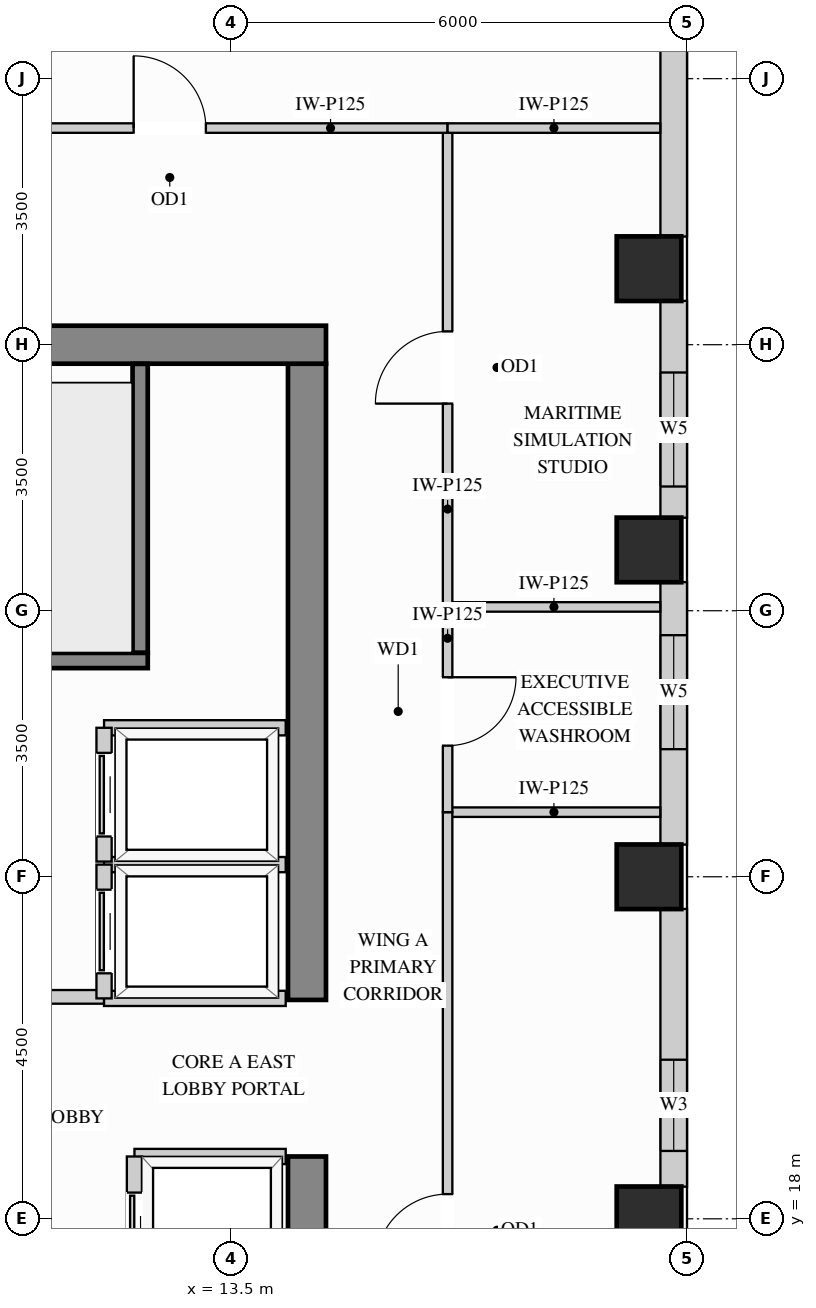
"""IFC4 building model, lengths in metres.
Left out: names, types, materials, properties, quantities, classifications, styles, units other than length and angle.
Written with IfcOpenShell. Run it as: python <this file> out.ifc"""

import sys

from ifc_helpers import new_model, si_unit, direction, frame, frame_2d, origin, origin_2d, place, context, subcontext, project, spatial, rectangle, extrude, source, transform, mapped, element, fill, save


model = new_model("IFC4")
c1 = context("Model", 3, precision=1e-05, world=origin(), true_north=direction((0.0, 1.0)))
c2 = subcontext(c1, "Body", "Model", "MODEL_VIEW")
j1 = project(units=[si_unit("LENGTHUNIT", "METRE"), si_unit("PLANEANGLEUNIT", "RADIAN")], contexts=[c1])
p1 = place(None, origin())
s1 = spatial("IfcSite", under=j1, at=p1, CompositionType="ELEMENT")
p2 = place(p1, origin())
s2 = spatial("IfcBuilding", under=s1, at=p2, CompositionType="ELEMENT")
p3 = place(p2, frame((0.0, 0.0, 266.4)))
s3 = spatial("IfcBuildingStorey", under=s2, at=p3, CompositionType="ELEMENT", Elevation=266.4)
m1 = source(origin(), c2, "Body", "SweptSolid", [
    extrude(rectangle(XDim=0.85, YDim=0.85, at=origin_2d()), origin(), (0.0, 0.0, 1.0), 3.4),
])
for number, where, z_axis, x_axis in (
    (1, (19.0, 18.0, 0.0), (0.0, 0.0, 1.0), (1.0, 0.0, 0.0)),
    (2, (19.0, 22.5, 0.0), (0.0, 0.0, 1.0), (1.0, 0.0, 0.0)),
    (3, (19.0, 26.8, 0.0), (0.0, 0.0, 1.0), (1.0, 0.0, 0.0)),
    (4, (19.0, 30.5, 0.0), (0.0, 0.0, 1.0), (1.0, 0.0, 0.0)),
):
    element("IfcColumn", number, at=place(p3, frame(where, z_axis=z_axis, x_axis=x_axis)), inside=s3, PredefinedType="COLUMN", context=c2, shape_type="MappedRepresentation", body=[
        mapped(m1, transform((0.0, 0.0, 0.0), x_axis=(1.0, 0.0, 0.0), y_axis=(0.0, 1.0, 0.0), z_axis=(0.0, 0.0, 1.0))),
    ])
m2 = source(origin(), c2, "Body", "SweptSolid", [
    extrude(rectangle(XDim=10.07, YDim=0.5, at=frame_2d((5.035, 0.0))), origin(), (0.0, 0.0, 1.0), 3.4),
])
p4 = place(p3, frame((14.5, 8.75, 0.0), z_axis=(0.0, 0.0, 1.0), x_axis=(0.0, 1.0, 0.0)))
e5 = element("IfcWall", 5, at=p4, inside=s3, PredefinedType="SHEAR", context=c2, shape_type="MappedRepresentation", body=[
    mapped(m2, transform((0.0, 0.0, 0.0), x_axis=(1.0, 0.0, 0.0), y_axis=(0.0, 1.0, 0.0), z_axis=(0.0, 0.0, 1.0))),
])
m3 = source(origin(), c2, "Body", "SweptSolid", [
    extrude(rectangle(XDim=8.37, YDim=0.5, at=frame_2d((4.185, 0.0))), origin(), (0.0, 0.0, 1.0), 3.4),
])
p5 = place(p3, frame((14.5, 20.88, 0.0), z_axis=(0.0, 0.0, 1.0), x_axis=(0.0, 1.0, 0.0)))
e6 = element("IfcWall", 6, at=p5, inside=s3, PredefinedType="SHEAR", context=c2, shape_type="MappedRepresentation", body=[
    mapped(m3, transform((0.0, 0.0, 0.0), x_axis=(1.0, 0.0, 0.0), y_axis=(0.0, 1.0, 0.0), z_axis=(0.0, 0.0, 1.0))),
])
m4 = source(origin(), c2, "Body", "SweptSolid", [
    extrude(rectangle(XDim=10.5, YDim=0.5, at=frame_2d((5.25, 0.0))), origin(), (0.0, 0.0, 1.0), 3.4),
])
p6 = place(p3, frame((4.25, 29.5, 0.0), z_axis=(0.0, 0.0, 1.0), x_axis=(1.0, 0.0, 0.0)))
e7 = element("IfcWall", 7, at=p6, inside=s3, PredefinedType="SHEAR", context=c2, shape_type="MappedRepresentation", body=[
    mapped(m4, transform((0.0, 0.0, 0.0), x_axis=(1.0, 0.0, 0.0), y_axis=(0.0, 1.0, 0.0), z_axis=(0.0, 0.0, 1.0))),
])
p7 = place(p3, frame((19.325, 18.423, 0.0), z_axis=(0.0, 0.0, 1.0), x_axis=(0.0, 1.0, 0.0)))
e8 = element("IfcWall", 8, at=p7, inside=s3, PredefinedType="SOLIDWALL", context=c2, shape_type="SweptSolid", body=[
    extrude(rectangle(XDim=3.654, YDim=0.35, at=frame_2d((1.827, 0.0))), origin(), (0.0, 0.0, 1.0), 2.619),
])
p8 = place(p7, frame((0.47, 0.0, 0.78)))
e9 = element("IfcOpeningElement", 9, at=p8, cuts=e8, PredefinedType="OPENING", context=c2, shape_type="SweptSolid", body=[
    extrude(rectangle(XDim=1.2, YDim=1.659, at=frame_2d((0.6, 0.83))), frame((0.0, 0.185, 0.0), z_axis=(0.0, -1.0, 0.0), x_axis=(1.0, 0.0, 0.0)), (0.0, 0.0, 1.0), 0.37),
])
p9 = place(p3, frame((19.325, 22.923, 0.0), z_axis=(0.0, 0.0, 1.0), x_axis=(0.0, 1.0, 0.0)))
e10 = element("IfcWall", 10, at=p9, inside=s3, PredefinedType="SOLIDWALL", context=c2, shape_type="SweptSolid", body=[
    extrude(rectangle(XDim=3.454, YDim=0.35, at=frame_2d((1.727, 0.0))), origin(), (0.0, 0.0, 1.0), 2.619),
])
p10 = place(p9, frame((1.256, 0.0, 0.78)))
e11 = element("IfcOpeningElement", 11, at=p10, cuts=e10, PredefinedType="OPENING", context=c2, shape_type="SweptSolid", body=[
    extrude(rectangle(XDim=1.5, YDim=1.659, at=frame_2d((0.75, 0.83))), frame((0.0, 0.185, 0.0), z_axis=(0.0, -1.0, 0.0), x_axis=(1.0, 0.0, 0.0)), (0.0, 0.0, 1.0), 0.37),
])
p11 = place(p3, frame((19.325, 27.223, 0.0), z_axis=(0.0, 0.0, 1.0), x_axis=(0.0, 1.0, 0.0)))
e12 = element("IfcWall", 12, at=p11, inside=s3, PredefinedType="SOLIDWALL", context=c2, shape_type="SweptSolid", body=[
    extrude(rectangle(XDim=2.854, YDim=0.35, at=frame_2d((1.427, 0.0))), origin(), (0.0, 0.0, 1.0), 2.619),
])
p12 = place(p11, frame((0.411, 0.0, 0.78)))
e13 = element("IfcOpeningElement", 13, at=p12, cuts=e12, PredefinedType="OPENING", context=c2, shape_type="SweptSolid", body=[
    extrude(rectangle(XDim=1.5, YDim=1.659, at=frame_2d((0.75, 0.83))), frame((0.0, 0.185, 0.0), z_axis=(0.0, -1.0, 0.0), x_axis=(1.0, 0.0, 0.0)), (0.0, 0.0, 1.0), 0.37),
])
m5 = source(origin(), c2, "Body", "SweptSolid", [
    extrude(rectangle(XDim=3.654, YDim=0.35, at=frame_2d((1.827, 0.0))), origin(), (0.0, 0.0, 1.0), 2.619),
])
p13 = place(p3, frame((19.325, 30.923, 0.0), z_axis=(0.0, 0.0, 1.0), x_axis=(0.0, 1.0, 0.0)))
e14 = element("IfcWall", 14, at=p13, inside=s3, PredefinedType="SOLIDWALL", context=c2, shape_type="MappedRepresentation", body=[
    mapped(m5, transform((0.0, 0.0, 0.0), x_axis=(1.0, 0.0, 0.0), y_axis=(0.0, 1.0, 0.0), z_axis=(0.0, 0.0, 1.0))),
])
p14 = place(p3, frame((7.15, 20.92, 0.0), z_axis=(0.0, 0.0, 1.0), x_axis=(1.0, 0.0, 0.0)))
e15 = element("IfcWall", 15, at=p14, inside=s3, PredefinedType="PARTITIONING", context=c2, shape_type="SweptSolid", body=[
    extrude(rectangle(XDim=4.68, YDim=0.18, at=frame_2d((2.34, 0.0))), origin(), (0.0, 0.0, 1.0), 3.385),
])
p15 = place(p14, frame((2.2, 0.0, 0.0)))
e16 = element("IfcOpeningElement", 16, at=p15, cuts=e15, PredefinedType="OPENING", context=c2, shape_type="SweptSolid", body=[
    extrude(rectangle(XDim=1.1, YDim=2.15, at=frame_2d((0.55, 1.075))), frame((0.0, 0.1, 0.0), z_axis=(0.0, -1.0, 0.0), x_axis=(1.0, 0.0, 0.0)), (0.0, 0.0, 1.0), 0.2),
])
m6 = source(origin(), c2, "Body", "SweptSolid", [
    extrude(rectangle(XDim=2.798, YDim=0.125, at=frame_2d((1.399, 0.0))), origin(), (0.0, 0.0, 1.0), 3.385),
])
for number, where, z_axis, x_axis in (
    (17, (16.35, 23.35, 0.0), (0.0, 0.0, 1.0), (1.0, 0.0, 0.0)),
    (18, (16.35, 26.05, 0.0), (0.0, 0.0, 1.0), (1.0, 0.0, 0.0)),
):
    element("IfcWall", number, at=place(p3, frame(where, z_axis=z_axis, x_axis=x_axis)), inside=s3, PredefinedType="PARTITIONING", context=c2, shape_type="MappedRepresentation", body=[
        mapped(m6, transform((0.0, 0.0, 0.0), x_axis=(1.0, 0.0, 0.0), y_axis=(0.0, 1.0, 0.0), z_axis=(0.0, 0.0, 1.0))),
    ])
p16 = place(p3, frame((16.35, 12.35, 0.0), z_axis=(0.0, 0.0, 1.0), x_axis=(0.0, 1.0, 0.0)))
e19 = element("IfcWall", 19, at=p16, inside=s3, PredefinedType="PARTITIONING", context=c2, shape_type="SweptSolid", body=[
    extrude(rectangle(XDim=11.0, YDim=0.125, at=frame_2d((5.5, 0.0))), origin(), (0.0, 0.0, 1.0), 3.385),
])
p17 = place(p16, frame((5.025, 0.0, 0.0)))
e20 = element("IfcOpeningElement", 20, at=p17, cuts=e19, PredefinedType="OPENING", context=c2, shape_type="SweptSolid", body=[
    extrude(rectangle(XDim=0.95, YDim=2.15, at=frame_2d((0.475, 1.075))), frame((0.0, 0.073, 0.0), z_axis=(0.0, -1.0, 0.0), x_axis=(1.0, 0.0, 0.0)), (0.0, 0.0, 1.0), 0.145),
])
p18 = place(p3, frame((16.35, 26.05, 0.0), z_axis=(0.0, 0.0, 1.0), x_axis=(0.0, 1.0, 0.0)))
e21 = element("IfcWall", 21, at=p18, inside=s3, PredefinedType="PARTITIONING", context=c2, shape_type="SweptSolid", body=[
    extrude(rectangle(XDim=6.3, YDim=0.125, at=frame_2d((3.15, 0.0))), origin(), (0.0, 0.0, 1.0), 3.385),
])
p19 = place(p18, frame((2.675, 0.0, 0.0)))
e22 = element("IfcOpeningElement", 22, at=p19, cuts=e21, PredefinedType="OPENING", context=c2, shape_type="SweptSolid", body=[
    extrude(rectangle(XDim=0.95, YDim=2.15, at=frame_2d((0.475, 1.075))), frame((0.0, 0.073, 0.0), z_axis=(0.0, -1.0, 0.0), x_axis=(1.0, 0.0, 0.0)), (0.0, 0.0, 1.0), 0.145),
])
p20 = place(p3, frame((16.35, 23.35, 0.0), z_axis=(0.0, 0.0, 1.0), x_axis=(0.0, 1.0, 0.0)))
e23 = element("IfcWall", 23, at=p20, inside=s3, PredefinedType="PARTITIONING", context=c2, shape_type="SweptSolid", body=[
    extrude(rectangle(XDim=2.7, YDim=0.125, at=frame_2d((1.35, 0.0))), origin(), (0.0, 0.0, 1.0), 3.385),
])
p21 = place(p20, frame((0.875, 0.0, 0.0)))
e24 = element("IfcOpeningElement", 24, at=p21, cuts=e23, PredefinedType="OPENING", context=c2, shape_type="SweptSolid", body=[
    extrude(rectangle(XDim=0.9, YDim=2.15, at=frame_2d((0.45, 1.075))), frame((0.0, 0.073, 0.0), z_axis=(0.0, -1.0, 0.0), x_axis=(1.0, 0.0, 0.0)), (0.0, 0.0, 1.0), 0.145),
])
p22 = place(p3, frame((9.039, 32.35, 0.0), z_axis=(0.0, 0.0, 1.0), x_axis=(1.0, 0.0, 0.0)))
e25 = element("IfcWall", 25, at=p22, inside=s3, PredefinedType="PARTITIONING", context=c2, shape_type="SweptSolid", body=[
    extrude(rectangle(XDim=7.311, YDim=0.125, at=frame_2d((3.656, 0.0))), origin(), (0.0, 0.0, 1.0), 3.385),
])
p23 = place(p22, frame((3.18, 0.0, 0.0)))
e26 = element("IfcOpeningElement", 26, at=p23, cuts=e25, PredefinedType="OPENING", context=c2, shape_type="SweptSolid", body=[
    extrude(rectangle(XDim=0.95, YDim=2.15, at=frame_2d((0.475, 1.075))), frame((0.0, 0.073, 0.0), z_axis=(0.0, -1.0, 0.0), x_axis=(1.0, 0.0, 0.0)), (0.0, 0.0, 1.0), 0.145),
])
p24 = place(p3, frame((16.35, 32.35, 0.0), z_axis=(0.0, 0.0, 1.0), x_axis=(1.0, 0.0, 0.0)))
e27 = element("IfcWall", 27, at=p24, inside=s3, PredefinedType="PARTITIONING", context=c2, shape_type="MappedRepresentation", body=[
    mapped(m6, transform((0.0, 0.0, 0.0), x_axis=(1.0, 0.0, 0.0), y_axis=(0.0, 1.0, 0.0), z_axis=(0.0, 0.0, 1.0))),
])
m7 = source(origin(), c2, "Body", "SweptSolid", [
    extrude(rectangle(XDim=2.39, YDim=0.2, at=frame_2d((1.195, 0.0))), origin(), (0.0, 0.0, 1.0), 3.385),
])
for number, where, z_axis, x_axis in (
    (28, (11.83, 22.66, 0.0), (0.0, 0.0, 1.0), (1.0, 0.0, 0.0)),
    (29, (11.83, 20.9, 0.0), (0.0, 0.0, 1.0), (1.0, 0.0, 0.0)),
):
    element("IfcWall", number, at=place(p3, frame(where, z_axis=z_axis, x_axis=x_axis)), inside=s3, PredefinedType="PARTITIONING", context=c2, shape_type="MappedRepresentation", body=[
        mapped(m7, transform((0.0, 0.0, 0.0), x_axis=(1.0, 0.0, 0.0), y_axis=(0.0, 1.0, 0.0), z_axis=(0.0, 0.0, 1.0))),
    ])
p25 = place(p3, frame((11.83, 20.9, 0.0), z_axis=(0.0, 0.0, 1.0), x_axis=(0.0, 1.0, 0.0)))
e30 = element("IfcWall", 30, at=p25, inside=s3, PredefinedType="PARTITIONING", context=c2, shape_type="SweptSolid", body=[
    extrude(rectangle(XDim=1.76, YDim=0.2, at=frame_2d((0.88, 0.0))), origin(), (0.0, 0.0, 1.0), 3.385),
])
p26 = place(p25, frame((0.33, 0.0, 0.0)))
e31 = element("IfcOpeningElement", 31, at=p26, cuts=e30, PredefinedType="OPENING", context=c2, shape_type="SweptSolid", body=[
    extrude(rectangle(XDim=1.1, YDim=2.2, at=frame_2d((0.55, 1.1))), frame((0.0, 0.11, 0.0), z_axis=(0.0, -1.0, 0.0), x_axis=(1.0, 0.0, 0.0)), (0.0, 0.0, 1.0), 0.22),
])
p27 = place(p3, frame((11.83, 24.46, 0.0), z_axis=(0.0, 0.0, 1.0), x_axis=(1.0, 0.0, 0.0)))
e32 = element("IfcWall", 32, at=p27, inside=s3, PredefinedType="PARTITIONING", context=c2, shape_type="MappedRepresentation", body=[
    mapped(m7, transform((0.0, 0.0, 0.0), x_axis=(1.0, 0.0, 0.0), y_axis=(0.0, 1.0, 0.0), z_axis=(0.0, 0.0, 1.0))),
])
p28 = place(p3, frame((11.83, 22.7, 0.0), z_axis=(0.0, 0.0, 1.0), x_axis=(0.0, 1.0, 0.0)))
e33 = element("IfcWall", 33, at=p28, inside=s3, PredefinedType="PARTITIONING", context=c2, shape_type="SweptSolid", body=[
    extrude(rectangle(XDim=1.76, YDim=0.2, at=frame_2d((0.88, 0.0))), origin(), (0.0, 0.0, 1.0), 3.385),
])
p29 = place(p28, frame((0.33, 0.0, 0.0)))
e34 = element("IfcOpeningElement", 34, at=p29, cuts=e33, PredefinedType="OPENING", context=c2, shape_type="SweptSolid", body=[
    extrude(rectangle(XDim=1.1, YDim=2.2, at=frame_2d((0.55, 1.1))), frame((0.0, 0.11, 0.0), z_axis=(0.0, -1.0, 0.0), x_axis=(1.0, 0.0, 0.0)), (0.0, 0.0, 1.0), 0.22),
])
m8 = source(origin(), c2, "Body", "SweptSolid", [
    extrude(rectangle(XDim=1.99, YDim=0.2, at=frame_2d((0.995, 0.0))), origin(), (0.0, 0.0, 1.0), 3.385),
])
p30 = place(p3, frame((12.23, 18.82, 0.0), z_axis=(0.0, 0.0, 1.0), x_axis=(1.0, 0.0, 0.0)))
e35 = element("IfcWall", 35, at=p30, inside=s3, PredefinedType="PARTITIONING", context=c2, shape_type="MappedRepresentation", body=[
    mapped(m8, transform((0.0, 0.0, 0.0), x_axis=(1.0, 0.0, 0.0), y_axis=(0.0, 1.0, 0.0), z_axis=(0.0, 0.0, 1.0))),
])
p31 = place(p3, frame((12.23, 16.77, 0.0), z_axis=(0.0, 0.0, 1.0), x_axis=(0.0, 1.0, 0.0)))
e36 = element("IfcWall", 36, at=p31, inside=s3, PredefinedType="PARTITIONING", context=c2, shape_type="SweptSolid", body=[
    extrude(rectangle(XDim=2.05, YDim=0.2, at=frame_2d((1.025, 0.0))), origin(), (0.0, 0.0, 1.0), 3.385),
])
p32 = place(p31, frame((0.475, 0.0, 0.0)))
e37 = element("IfcOpeningElement", 37, at=p32, cuts=e36, PredefinedType="OPENING", context=c2, shape_type="SweptSolid", body=[
    extrude(rectangle(XDim=1.1, YDim=2.2, at=frame_2d((0.55, 1.1))), frame((0.0, 0.11, 0.0), z_axis=(0.0, -1.0, 0.0), x_axis=(1.0, 0.0, 0.0)), (0.0, 0.0, 1.0), 0.22),
])
m9 = source(origin(), c2, "Body", "SweptSolid", [
    extrude(rectangle(XDim=3.803, YDim=0.2, at=frame_2d((1.901, 0.0))), origin(), (0.0, 0.0, 1.0), 3.4),
])
p33 = place(p3, frame((12.305, 25.445, 0.0), z_axis=(0.0, 0.0, 1.0), x_axis=(0.0, 1.0, 0.0)))
e38 = element("IfcWall", 38, at=p33, inside=s3, PredefinedType="SHEAR", context=c2, shape_type="MappedRepresentation", body=[
    mapped(m9, transform((0.0, 0.0, 0.0), x_axis=(1.0, 0.0, 0.0), y_axis=(0.0, 1.0, 0.0), z_axis=(0.0, 0.0, 1.0))),
])
p34 = place(p3, frame((4.752, 25.345, 0.0), z_axis=(0.0, 0.0, 1.0), x_axis=(1.0, 0.0, 0.0)))
e39 = element("IfcWall", 39, at=p34, inside=s3, PredefinedType="SHEAR", context=c2, shape_type="SweptSolid", body=[
    extrude(rectangle(XDim=7.653, YDim=0.2, at=frame_2d((3.827, 0.0))), origin(), (0.0, 0.0, 1.0), 3.4),
])
p35 = place(p34, frame((0.4, 0.0, 0.0)))
e40 = element("IfcOpeningElement", 40, at=p35, cuts=e39, PredefinedType="OPENING", context=c2, shape_type="SweptSolid", body=[
    extrude(rectangle(XDim=1.1, YDim=2.15, at=frame_2d((0.55, 1.075))), frame((0.0, 0.11, 0.0), z_axis=(0.0, -1.0, 0.0), x_axis=(1.0, 0.0, 0.0)), (0.0, 0.0, 1.0), 0.22),
])
m10 = source(origin(), c2, "Body", "SweptSolid", [
    extrude(rectangle(XDim=1.1, YDim=2.2, at=frame_2d((0.55, 1.1))), frame((0.0, 0.025, 0.0), z_axis=(0.0, -1.0, 0.0), x_axis=(1.0, 0.0, 0.0)), (0.0, 0.0, 1.0), 0.05),
])
p36 = place(p26, origin())
e41 = element("IfcDoor", 41, at=p36, inside=s3, OperationType="SLIDING_TO_LEFT", PredefinedType="DOOR", context=c2, shape_type="MappedRepresentation", body=[
    mapped(m10, transform((0.0, 0.0, 0.0), x_axis=(1.0, 0.0, 0.0), y_axis=(0.0, 1.0, 0.0), z_axis=(0.0, 0.0, 1.0))),
])
fill(e31, e41)
p37 = place(p29, origin())
e42 = element("IfcDoor", 42, at=p37, inside=s3, OperationType="SLIDING_TO_LEFT", PredefinedType="DOOR", context=c2, shape_type="MappedRepresentation", body=[
    mapped(m10, transform((0.0, 0.0, 0.0), x_axis=(1.0, 0.0, 0.0), y_axis=(0.0, 1.0, 0.0), z_axis=(0.0, 0.0, 1.0))),
])
fill(e34, e42)
p38 = place(p32, origin())
e43 = element("IfcDoor", 43, at=p38, inside=s3, OperationType="SLIDING_TO_LEFT", PredefinedType="DOOR", context=c2, shape_type="MappedRepresentation", body=[
    mapped(m10, transform((0.0, 0.0, 0.0), x_axis=(1.0, 0.0, 0.0), y_axis=(0.0, 1.0, 0.0), z_axis=(0.0, 0.0, 1.0))),
])
fill(e37, e43)
m11 = source(origin(), c2, "Body", "SweptSolid", [
    extrude(rectangle(XDim=0.95, YDim=2.15, at=frame_2d((0.475, 1.075))), frame((0.0, 0.025, 0.0), z_axis=(0.0, -1.0, 0.0), x_axis=(1.0, 0.0, 0.0)), (0.0, 0.0, 1.0), 0.05),
])
p39 = place(p17, origin())
e44 = element("IfcDoor", 44, at=p39, inside=s3, OperationType="SINGLE_SWING_LEFT", PredefinedType="DOOR", context=c2, shape_type="MappedRepresentation", body=[
    mapped(m11, transform((0.0, 0.0, 0.0), x_axis=(1.0, 0.0, 0.0), y_axis=(0.0, 1.0, 0.0), z_axis=(0.0, 0.0, 1.0))),
])
fill(e20, e44)
p40 = place(p19, origin())
e45 = element("IfcDoor", 45, at=p40, inside=s3, OperationType="SINGLE_SWING_LEFT", PredefinedType="DOOR", context=c2, shape_type="MappedRepresentation", body=[
    mapped(m11, transform((0.0, 0.0, 0.0), x_axis=(1.0, 0.0, 0.0), y_axis=(0.0, 1.0, 0.0), z_axis=(0.0, 0.0, 1.0))),
])
fill(e22, e45)
p41 = place(p23, origin())
e46 = element("IfcDoor", 46, at=p41, inside=s3, OperationType="SINGLE_SWING_LEFT", PredefinedType="DOOR", context=c2, shape_type="MappedRepresentation", body=[
    mapped(m11, transform((0.0, 0.0, 0.0), x_axis=(1.0, 0.0, 0.0), y_axis=(0.0, 1.0, 0.0), z_axis=(0.0, 0.0, 1.0))),
])
fill(e26, e46)
m12 = source(origin(), c2, "Body", "SweptSolid", [
    extrude(rectangle(XDim=0.9, YDim=2.15, at=frame_2d((0.45, 1.075))), frame((0.0, 0.025, 0.0), z_axis=(0.0, -1.0, 0.0), x_axis=(1.0, 0.0, 0.0)), (0.0, 0.0, 1.0), 0.05),
])
p42 = place(p21, origin())
e47 = element("IfcDoor", 47, at=p42, inside=s3, OperationType="SINGLE_SWING_RIGHT", PredefinedType="DOOR", context=c2, shape_type="MappedRepresentation", body=[
    mapped(m12, transform((0.0, 0.0, 0.0), x_axis=(1.0, 0.0, 0.0), y_axis=(0.0, 1.0, 0.0), z_axis=(0.0, 0.0, 1.0))),
])
fill(e24, e47)
m13 = source(origin(), c2, "Body", "SweptSolid", [
    extrude(rectangle(XDim=1.2, YDim=1.659, at=frame_2d((0.6, 0.83))), frame((0.0, 0.03, 0.0), z_axis=(0.0, -1.0, 0.0), x_axis=(1.0, 0.0, 0.0)), (0.0, 0.0, 1.0), 0.06),
])
p43 = place(p8, origin())
e48 = element("IfcWindow", 48, at=p43, inside=s3, PartitioningType="SINGLE_PANEL", PredefinedType="WINDOW", context=c2, shape_type="MappedRepresentation", body=[
    mapped(m13, transform((0.0, 0.0, 0.0), x_axis=(1.0, 0.0, 0.0), y_axis=(0.0, 1.0, 0.0), z_axis=(0.0, 0.0, 1.0))),
])
fill(e9, e48)
m14 = source(origin(), c2, "Body", "SweptSolid", [
    extrude(rectangle(XDim=1.5, YDim=1.659, at=frame_2d((0.75, 0.83))), frame((0.0, 0.03, 0.0), z_axis=(0.0, -1.0, 0.0), x_axis=(1.0, 0.0, 0.0)), (0.0, 0.0, 1.0), 0.06),
])
p44 = place(p10, origin())
e49 = element("IfcWindow", 49, at=p44, inside=s3, PartitioningType="SINGLE_PANEL", PredefinedType="WINDOW", context=c2, shape_type="MappedRepresentation", body=[
    mapped(m14, transform((0.0, 0.0, 0.0), x_axis=(1.0, 0.0, 0.0), y_axis=(0.0, 1.0, 0.0), z_axis=(0.0, 0.0, 1.0))),
])
fill(e11, e49)
p45 = place(p12, origin())
e50 = element("IfcWindow", 50, at=p45, inside=s3, PartitioningType="SINGLE_PANEL", PredefinedType="WINDOW", context=c2, shape_type="MappedRepresentation", body=[
    mapped(m14, transform((0.0, 0.0, 0.0), x_axis=(1.0, 0.0, 0.0), y_axis=(0.0, 1.0, 0.0), z_axis=(0.0, 0.0, 1.0))),
])
fill(e13, e50)
save(model, sys.argv[1])
